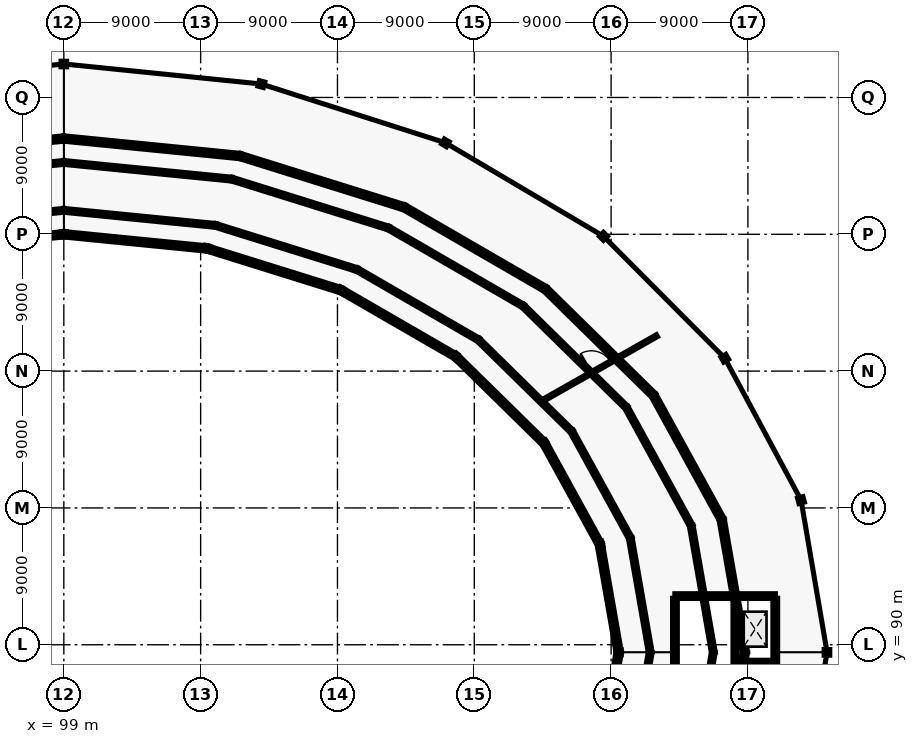
"""IFC4 building model, lengths in metres.
Left out: names, types, materials, properties, quantities, classifications, styles, units other than length and angle.
Written with IfcOpenShell. Run it as: python <this file> out.ifc"""

import sys

from ifc_helpers import new_model, si_unit, direction, frame, frame_2d, origin, origin_2d, place, context, subcontext, project, spatial, rectangle, hollow_circle, extrude, element, fill, save


model = new_model("IFC4")
c1 = context("Model", 3, precision=1e-05, world=origin(), true_north=direction((0.0, 1.0)))
c2 = subcontext(c1, "Body", "Model", "MODEL_VIEW")
j1 = project(units=[si_unit("LENGTHUNIT", "METRE"), si_unit("PLANEANGLEUNIT", "RADIAN")], contexts=[c1])
p1 = place(None, origin())
s1 = spatial("IfcSite", under=j1, at=p1, CompositionType="ELEMENT")
p2 = place(p1, origin())
s2 = spatial("IfcBuilding", under=s1, at=p2, CompositionType="ELEMENT")
p3 = place(p2, frame((0.0, 0.0, 9.6)))
s3 = spatial("IfcBuildingStorey", under=s2, at=p3, CompositionType="ELEMENT", Elevation=9.6)
p4 = place(p3, frame((135.5, 89.5, 0.0), z_axis=(0.0, 0.0, 1.0), x_axis=(1.0, 0.0, 0.0)))
e1 = element("IfcColumn", 1, at=p4, inside=s3, PredefinedType="COLUMN", context=c2, shape_type="SweptSolid", body=[
    extrude(hollow_circle(Radius=0.162, WallThickness=0.016, at=origin_2d()), origin(), (0.0, 0.0, 1.0), 4.38),
])
p5 = place(p3, frame((149.2, 89.5, 0.0), z_axis=(0.0, 0.0, 1.0), x_axis=(1.0, 0.0, 0.0)))
e2 = element("IfcColumn", 2, at=p5, inside=s3, PredefinedType="COLUMN", context=c2, shape_type="SweptSolid", body=[
    extrude(hollow_circle(Radius=0.178, WallThickness=0.016, at=origin_2d()), origin(), (0.0, 0.0, 1.0), 3.38),
])
p6 = place(p3, frame((134.256, 96.618, 0.0), z_axis=(0.0, 0.0, 1.0), x_axis=(0.965925826289, 0.258819045103, 0.0)))
e3 = element("IfcColumn", 3, at=p6, inside=s3, PredefinedType="COLUMN", context=c2, shape_type="SweptSolid", body=[
    extrude(hollow_circle(Radius=0.162, WallThickness=0.016, at=origin_2d()), origin(), (0.0, 0.0, 1.0), 4.38),
])
p7 = place(p3, frame((147.489, 99.516, 0.0), z_axis=(0.0, 0.0, 1.0), x_axis=(0.965925826289, 0.258819045103, 0.0)))
e4 = element("IfcColumn", 4, at=p7, inside=s3, PredefinedType="COLUMN", context=c2, shape_type="SweptSolid", body=[
    extrude(hollow_circle(Radius=0.178, WallThickness=0.016, at=origin_2d()), origin(), (0.0, 0.0, 1.0), 3.38),
])
p8 = place(p3, frame((130.61, 103.25, 0.0), z_axis=(0.0, 0.0, 1.0), x_axis=(0.866025403784, 0.5, 0.0)))
e5 = element("IfcColumn", 5, at=p8, inside=s3, PredefinedType="COLUMN", context=c2, shape_type="SweptSolid", body=[
    extrude(hollow_circle(Radius=0.162, WallThickness=0.016, at=origin_2d()), origin(), (0.0, 0.0, 1.0), 4.38),
])
p9 = place(p3, frame((142.474, 108.85, 0.0), z_axis=(0.0, 0.0, 1.0), x_axis=(0.866025403784, 0.5, 0.0)))
e6 = element("IfcColumn", 6, at=p9, inside=s3, PredefinedType="COLUMN", context=c2, shape_type="SweptSolid", body=[
    extrude(hollow_circle(Radius=0.178, WallThickness=0.016, at=origin_2d()), origin(), (0.0, 0.0, 1.0), 3.38),
])
p10 = place(p3, frame((124.809, 108.945, 0.0), z_axis=(0.0, 0.0, 1.0), x_axis=(0.707106781187, 0.707106781187, 0.0)))
e7 = element("IfcColumn", 7, at=p10, inside=s3, PredefinedType="COLUMN", context=c2, shape_type="SweptSolid", body=[
    extrude(hollow_circle(Radius=0.162, WallThickness=0.016, at=origin_2d()), origin(), (0.0, 0.0, 1.0), 4.38),
])
p11 = place(p3, frame((134.497, 116.865, 0.0), z_axis=(0.0, 0.0, 1.0), x_axis=(0.707106781187, 0.707106781187, 0.0)))
e8 = element("IfcColumn", 8, at=p11, inside=s3, PredefinedType="COLUMN", context=c2, shape_type="SweptSolid", body=[
    extrude(hollow_circle(Radius=0.178, WallThickness=0.016, at=origin_2d()), origin(), (0.0, 0.0, 1.0), 3.38),
])
p12 = place(p3, frame((117.25, 113.316, 0.0), z_axis=(0.0, 0.0, 1.0), x_axis=(0.5, 0.866025403784, 0.0)))
e9 = element("IfcColumn", 9, at=p12, inside=s3, PredefinedType="COLUMN", context=c2, shape_type="SweptSolid", body=[
    extrude(hollow_circle(Radius=0.162, WallThickness=0.016, at=origin_2d()), origin(), (0.0, 0.0, 1.0), 4.38),
])
p13 = place(p3, frame((124.1, 123.015, 0.0), z_axis=(0.0, 0.0, 1.0), x_axis=(0.5, 0.866025403784, 0.0)))
e10 = element("IfcColumn", 10, at=p13, inside=s3, PredefinedType="COLUMN", context=c2, shape_type="SweptSolid", body=[
    extrude(hollow_circle(Radius=0.178, WallThickness=0.016, at=origin_2d()), origin(), (0.0, 0.0, 1.0), 3.38),
])
p14 = place(p3, frame((108.447, 116.063, 0.0), z_axis=(0.0, 0.0, 1.0), x_axis=(0.258819045103, 0.965925826289, 0.0)))
e11 = element("IfcColumn", 11, at=p14, inside=s3, PredefinedType="COLUMN", context=c2, shape_type="SweptSolid", body=[
    extrude(hollow_circle(Radius=0.162, WallThickness=0.016, at=origin_2d()), origin(), (0.0, 0.0, 1.0), 4.38),
])
p15 = place(p3, frame((111.993, 126.881, 0.0), z_axis=(0.0, 0.0, 1.0), x_axis=(0.258819045103, 0.965925826289, 0.0)))
e12 = element("IfcColumn", 12, at=p15, inside=s3, PredefinedType="COLUMN", context=c2, shape_type="SweptSolid", body=[
    extrude(hollow_circle(Radius=0.178, WallThickness=0.016, at=origin_2d()), origin(), (0.0, 0.0, 1.0), 3.38),
])
p16 = place(p3, frame((99.0, 117.0, 0.0), z_axis=(0.0, 0.0, 1.0), x_axis=(0.0, 1.0, 0.0)))
e13 = element("IfcColumn", 13, at=p16, inside=s3, PredefinedType="COLUMN", context=c2, shape_type="SweptSolid", body=[
    extrude(hollow_circle(Radius=0.162, WallThickness=0.016, at=origin_2d()), origin(), (0.0, 0.0, 1.0), 4.38),
])
p17 = place(p3, frame((99.0, 128.2, 0.0), z_axis=(0.0, 0.0, 1.0), x_axis=(0.0, 1.0, 0.0)))
e14 = element("IfcColumn", 14, at=p17, inside=s3, PredefinedType="COLUMN", context=c2, shape_type="SweptSolid", body=[
    extrude(hollow_circle(Radius=0.178, WallThickness=0.016, at=origin_2d()), origin(), (0.0, 0.0, 1.0), 3.38),
])
p18 = place(p3, frame((143.8, 89.5, 4.53), z_axis=(0.0, 0.0, 1.0), x_axis=(-0.171964181022, 0.985103202941, 0.0)))
e15 = element("IfcWall", 15, at=p18, inside=s3, PredefinedType="SOLIDWALL", context=c2, shape_type="SweptSolid", body=[
    extrude(rectangle(XDim=8.88, YDim=0.34, at=frame_2d((4.44, 0.0))), origin(), (0.0, 0.0, 1.0), 3.02),
])
p19 = place(p3, frame((135.5, 89.5, 4.39), z_axis=(0.0, 0.0, 1.0), x_axis=(-0.172146745201, 0.985071316259, 0.0)))
e16 = element("IfcWall", 16, at=p19, inside=s3, PredefinedType="SOLIDWALL", context=c2, shape_type="SweptSolid", body=[
    extrude(rectangle(XDim=7.226, YDim=0.34, at=frame_2d((3.613, 0.0))), origin(), (0.0, 0.0, 1.0), 3.16),
])
p20 = place(p3, frame((141.725, 89.5, 7.58), z_axis=(0.0, 0.0, 1.0), x_axis=(-0.171983700119, 0.985099795398, 0.0)))
e17 = element("IfcWall", 17, at=p20, inside=s3, PredefinedType="SOLIDWALL", context=c2, shape_type="SweptSolid", body=[
    extrude(rectangle(XDim=8.466, YDim=0.24, at=frame_2d((4.233, 0.0))), origin(), (0.0, 0.0, 1.0), 2.37),
])
p21 = place(p3, frame((137.575, 89.5, 7.58), z_axis=(0.0, 0.0, 1.0), x_axis=(-0.172012838792, 0.985094707777, 0.0)))
e18 = element("IfcWall", 18, at=p21, inside=s3, PredefinedType="SOLIDWALL", context=c2, shape_type="SweptSolid", body=[
    extrude(rectangle(XDim=7.639, YDim=0.24, at=frame_2d((3.819, 0.0))), origin(), (0.0, 0.0, 1.0), 2.37),
])
p22 = place(p3, frame((142.273, 98.248, 4.53), z_axis=(0.0, 0.0, 1.0), x_axis=(-0.481203038707, 0.876609169208, 0.0)))
e19 = element("IfcWall", 19, at=p22, inside=s3, PredefinedType="SOLIDWALL", context=c2, shape_type="SweptSolid", body=[
    extrude(rectangle(XDim=9.299, YDim=0.34, at=frame_2d((4.65, 0.0))), origin(), (0.0, 0.0, 1.0), 3.02),
])
p23 = place(p3, frame((134.256, 96.618, 4.39), z_axis=(0.0, 0.0, 1.0), x_axis=(-0.481751565348, 0.876307839338, 0.0)))
e20 = element("IfcWall", 20, at=p23, inside=s3, PredefinedType="SOLIDWALL", context=c2, shape_type="SweptSolid", body=[
    extrude(rectangle(XDim=7.568, YDim=0.34, at=frame_2d((3.784, 0.0))), origin(), (0.0, 0.0, 1.0), 3.16),
])
p24 = place(p3, frame((140.269, 97.84, 7.58), z_axis=(0.0, 0.0, 1.0), x_axis=(-0.481354223541, 0.87652616132, 0.0)))
e21 = element("IfcWall", 21, at=p24, inside=s3, PredefinedType="SOLIDWALL", context=c2, shape_type="SweptSolid", body=[
    extrude(rectangle(XDim=8.867, YDim=0.24, at=frame_2d((4.433, 0.0))), origin(), (0.0, 0.0, 1.0), 2.37),
])
p25 = place(p3, frame((136.261, 97.025, 7.58), z_axis=(0.0, 0.0, 1.0), x_axis=(-0.481658705075, 0.876358883007, 0.0)))
e22 = element("IfcWall", 22, at=p25, inside=s3, PredefinedType="SOLIDWALL", context=c2, shape_type="SweptSolid", body=[
    extrude(rectangle(XDim=8.001, YDim=0.24, at=frame_2d((4.001, 0.0))), origin(), (0.0, 0.0, 1.0), 2.37),
])
p26 = place(p3, frame((137.798, 106.4, 4.53), z_axis=(0.0, 0.0, 1.0), x_axis=(-0.713096204455, 0.701066190307, 0.0)))
e23 = element("IfcWall", 23, at=p26, inside=s3, PredefinedType="SOLIDWALL", context=c2, shape_type="SweptSolid", body=[
    extrude(rectangle(XDim=9.985, YDim=0.34, at=frame_2d((4.992, 0.0))), origin(), (0.0, 0.0, 1.0), 3.02),
])
p27 = place(p3, frame((130.61, 103.25, 4.39), z_axis=(0.0, 0.0, 1.0), x_axis=(-0.713593723838, 0.700559774251, 0.0)))
e24 = element("IfcWall", 24, at=p27, inside=s3, PredefinedType="SOLIDWALL", context=c2, shape_type="SweptSolid", body=[
    extrude(rectangle(XDim=8.129, YDim=0.34, at=frame_2d((4.065, 0.0))), origin(), (0.0, 0.0, 1.0), 3.16),
])
p28 = place(p3, frame((136.001, 105.612, 7.58), z_axis=(0.0, 0.0, 1.0), x_axis=(-0.71311938496, 0.701042611254, 0.0)))
e25 = element("IfcWall", 25, at=p28, inside=s3, PredefinedType="SOLIDWALL", context=c2, shape_type="SweptSolid", body=[
    extrude(rectangle(XDim=9.521, YDim=0.24, at=frame_2d((4.761, 0.0))), origin(), (0.0, 0.0, 1.0), 2.37),
])
p29 = place(p3, frame((132.407, 104.037, 7.58), z_axis=(0.0, 0.0, 1.0), x_axis=(-0.713357861119, 0.700799944335, 0.0)))
e26 = element("IfcWall", 26, at=p29, inside=s3, PredefinedType="SOLIDWALL", context=c2, shape_type="SweptSolid", body=[
    extrude(rectangle(XDim=8.593, YDim=0.24, at=frame_2d((4.296, 0.0))), origin(), (0.0, 0.0, 1.0), 2.37),
])
p30 = place(p3, frame((130.678, 113.4, 4.53), z_axis=(0.0, 0.0, 1.0), x_axis=(-0.865403937833, 0.501074869039, 0.0)))
e27 = element("IfcWall", 27, at=p30, inside=s3, PredefinedType="SOLIDWALL", context=c2, shape_type="SweptSolid", body=[
    extrude(rectangle(XDim=10.721, YDim=0.34, at=frame_2d((5.361, 0.0))), origin(), (0.0, 0.0, 1.0), 3.02),
])
p31 = place(p3, frame((124.809, 108.945, 4.39), z_axis=(0.0, 0.0, 1.0), x_axis=(-0.865697347457, 0.500567780231, 0.0)))
e28 = element("IfcWall", 28, at=p31, inside=s3, PredefinedType="SOLIDWALL", context=c2, shape_type="SweptSolid", body=[
    extrude(rectangle(XDim=8.732, YDim=0.34, at=frame_2d((4.366, 0.0))), origin(), (0.0, 0.0, 1.0), 3.16),
])
p32 = place(p3, frame((129.211, 112.287, 7.58), z_axis=(0.0, 0.0, 1.0), x_axis=(-0.865494949489, 0.500917650328, 0.0)))
e29 = element("IfcWall", 29, at=p32, inside=s3, PredefinedType="SOLIDWALL", context=c2, shape_type="SweptSolid", body=[
    extrude(rectangle(XDim=10.223, YDim=0.24, at=frame_2d((5.111, 0.0))), origin(), (0.0, 0.0, 1.0), 2.37),
])
p33 = place(p3, frame((126.277, 110.059, 7.58), z_axis=(0.0, 0.0, 1.0), x_axis=(-0.865631472937, 0.500681688362, 0.0)))
e30 = element("IfcWall", 30, at=p33, inside=s3, PredefinedType="SOLIDWALL", context=c2, shape_type="SweptSolid", body=[
    extrude(rectangle(XDim=9.229, YDim=0.24, at=frame_2d((4.615, 0.0))), origin(), (0.0, 0.0, 1.0), 2.37),
])
p34 = place(p3, frame((121.4, 118.772, 4.53), z_axis=(0.0, 0.0, 1.0), x_axis=(-0.95449417592, 0.298229556107, 0.0)))
e31 = element("IfcWall", 31, at=p34, inside=s3, PredefinedType="SOLIDWALL", context=c2, shape_type="SweptSolid", body=[
    extrude(rectangle(XDim=11.32, YDim=0.34, at=frame_2d((5.66, 0.0))), origin(), (0.0, 0.0, 1.0), 3.02),
])
p35 = place(p3, frame((117.25, 113.316, 4.39), z_axis=(0.0, 0.0, 1.0), x_axis=(-0.9545990852, 0.297893582568, 0.0)))
e32 = element("IfcWall", 32, at=p35, inside=s3, PredefinedType="SOLIDWALL", context=c2, shape_type="SweptSolid", body=[
    extrude(rectangle(XDim=9.222, YDim=0.34, at=frame_2d((4.611, 0.0))), origin(), (0.0, 0.0, 1.0), 3.16),
])
p36 = place(p3, frame((120.363, 117.408, 7.58), z_axis=(0.0, 0.0, 1.0), x_axis=(-0.954514174424, 0.298165542651, 0.0)))
e33 = element("IfcWall", 33, at=p36, inside=s3, PredefinedType="SOLIDWALL", context=c2, shape_type="SweptSolid", body=[
    extrude(rectangle(XDim=10.796, YDim=0.24, at=frame_2d((5.398, 0.0))), origin(), (0.0, 0.0, 1.0), 2.37),
])
p37 = place(p3, frame((118.288, 114.68, 7.58), z_axis=(0.0, 0.0, 1.0), x_axis=(-0.954582431614, 0.29794694369, 0.0)))
e34 = element("IfcWall", 34, at=p37, inside=s3, PredefinedType="SOLIDWALL", context=c2, shape_type="SweptSolid", body=[
    extrude(rectangle(XDim=9.747, YDim=0.24, at=frame_2d((4.874, 0.0))), origin(), (0.0, 0.0, 1.0), 2.37),
])
p38 = place(p3, frame((110.595, 122.148, 4.53), z_axis=(0.0, 0.0, 1.0), x_axis=(-0.995099849345, 0.098875122419, 0.0)))
e35 = element("IfcWall", 35, at=p38, inside=s3, PredefinedType="SOLIDWALL", context=c2, shape_type="SweptSolid", body=[
    extrude(rectangle(XDim=11.652, YDim=0.34, at=frame_2d((5.826, 0.0))), origin(), (0.0, 0.0, 1.0), 3.02),
])
p39 = place(p3, frame((108.447, 116.063, 4.39), z_axis=(0.0, 0.0, 1.0), x_axis=(-0.995117073258, 0.098701623651, 0.0)))
e36 = element("IfcWall", 36, at=p39, inside=s3, PredefinedType="SOLIDWALL", context=c2, shape_type="SweptSolid", body=[
    extrude(rectangle(XDim=9.493, YDim=0.34, at=frame_2d((4.747, 0.0))), origin(), (0.0, 0.0, 1.0), 3.16),
])
p40 = place(p3, frame((110.058, 120.627, 7.58), z_axis=(0.0, 0.0, 1.0), x_axis=(-0.995105258288, 0.098820670548, 0.0)))
e37 = element("IfcWall", 37, at=p40, inside=s3, PredefinedType="SOLIDWALL", context=c2, shape_type="SweptSolid", body=[
    extrude(rectangle(XDim=11.113, YDim=0.24, at=frame_2d((5.556, 0.0))), origin(), (0.0, 0.0, 1.0), 2.37),
])
p41 = place(p3, frame((108.984, 117.584, 7.58), z_axis=(0.0, 0.0, 1.0), x_axis=(-0.995110163253, 0.098771266021, 0.0)))
e38 = element("IfcWall", 38, at=p41, inside=s3, PredefinedType="SOLIDWALL", context=c2, shape_type="SweptSolid", body=[
    extrude(rectangle(XDim=10.033, YDim=0.24, at=frame_2d((5.017, 0.0))), origin(), (0.0, 0.0, 1.0), 2.37),
])
p42 = place(p3, frame((99.0, 123.3, 4.53), z_axis=(0.0, 0.0, 1.0), x_axis=(-0.995099849345, -0.098875122419, 0.0)))
e39 = element("IfcWall", 39, at=p42, inside=s3, PredefinedType="SOLIDWALL", context=c2, shape_type="SweptSolid", body=[
    extrude(rectangle(XDim=11.652, YDim=0.34, at=frame_2d((5.826, 0.0))), origin(), (0.0, 0.0, 1.0), 3.02),
])
p43 = place(p3, frame((99.0, 117.0, 4.39), z_axis=(0.0, 0.0, 1.0), x_axis=(-0.995117073258, -0.098701623651, 0.0)))
e40 = element("IfcWall", 40, at=p43, inside=s3, PredefinedType="SOLIDWALL", context=c2, shape_type="SweptSolid", body=[
    extrude(rectangle(XDim=9.493, YDim=0.34, at=frame_2d((4.747, 0.0))), origin(), (0.0, 0.0, 1.0), 3.16),
])
p44 = place(p3, frame((99.0, 121.725, 7.58), z_axis=(0.0, 0.0, 1.0), x_axis=(-0.995105258288, -0.098820670548, 0.0)))
e41 = element("IfcWall", 41, at=p44, inside=s3, PredefinedType="SOLIDWALL", context=c2, shape_type="SweptSolid", body=[
    extrude(rectangle(XDim=11.113, YDim=0.24, at=frame_2d((5.556, 0.0))), origin(), (0.0, 0.0, 1.0), 2.37),
])
p45 = place(p3, frame((99.0, 118.575, 7.58), z_axis=(0.0, 0.0, 1.0), x_axis=(-0.995110163253, -0.098771266021, 0.0)))
e42 = element("IfcWall", 42, at=p45, inside=s3, PredefinedType="SOLIDWALL", context=c2, shape_type="SweptSolid", body=[
    extrude(rectangle(XDim=10.033, YDim=0.24, at=frame_2d((5.017, 0.0))), origin(), (0.0, 0.0, 1.0), 2.37),
])
p46 = place(p3, frame((142.273, 80.752, 4.53), z_axis=(0.0, 0.0, 1.0), x_axis=(0.171964181022, 0.985103202941, 0.0)))
e43 = element("IfcWall", 43, at=p46, inside=s3, PredefinedType="SOLIDWALL", context=c2, shape_type="SweptSolid", body=[
    extrude(rectangle(XDim=8.88, YDim=0.34, at=frame_2d((4.44, 0.0))), origin(), (0.0, 0.0, 1.0), 3.02),
])
p47 = place(p3, frame((134.256, 82.382, 4.39), z_axis=(0.0, 0.0, 1.0), x_axis=(0.172146745201, 0.985071316259, 0.0)))
e44 = element("IfcWall", 44, at=p47, inside=s3, PredefinedType="SOLIDWALL", context=c2, shape_type="SweptSolid", body=[
    extrude(rectangle(XDim=7.226, YDim=0.34, at=frame_2d((3.613, 0.0))), origin(), (0.0, 0.0, 1.0), 3.16),
])
p48 = place(p3, frame((140.269, 81.16, 7.58), z_axis=(0.0, 0.0, 1.0), x_axis=(0.171983700119, 0.985099795398, 0.0)))
e45 = element("IfcWall", 45, at=p48, inside=s3, PredefinedType="SOLIDWALL", context=c2, shape_type="SweptSolid", body=[
    extrude(rectangle(XDim=8.466, YDim=0.24, at=frame_2d((4.233, 0.0))), origin(), (0.0, 0.0, 1.0), 2.37),
])
p49 = place(p3, frame((136.261, 81.975, 7.58), z_axis=(0.0, 0.0, 1.0), x_axis=(0.172012838792, 0.985094707777, 0.0)))
e46 = element("IfcWall", 46, at=p49, inside=s3, PredefinedType="SOLIDWALL", context=c2, shape_type="SweptSolid", body=[
    extrude(rectangle(XDim=7.639, YDim=0.24, at=frame_2d((3.819, 0.0))), origin(), (0.0, 0.0, 1.0), 2.37),
])
p50 = place(p3, frame((139.2, 93.2, 0.0), z_axis=(0.0, 0.0, 1.0), x_axis=(1.0, 0.0, 0.0)))
e47 = element("IfcWall", 47, at=p50, inside=s3, PredefinedType="SHEAR", context=c2, shape_type="SweptSolid", body=[
    extrude(rectangle(XDim=6.6, YDim=0.3, at=frame_2d((3.3, 0.0))), origin(), (0.0, 0.0, 1.0), 3.4),
])
p51 = place(p3, frame((139.2, 85.95, 0.0), z_axis=(0.0, 0.0, 1.0), x_axis=(0.0, 1.0, 0.0)))
e48 = element("IfcWall", 48, at=p51, inside=s3, PredefinedType="SHEAR", context=c2, shape_type="SweptSolid", body=[
    extrude(rectangle(XDim=7.1, YDim=0.3, at=frame_2d((3.55, 0.0))), origin(), (0.0, 0.0, 1.0), 3.4),
])
p52 = place(p3, frame((145.8, 85.95, 0.0), z_axis=(0.0, 0.0, 1.0), x_axis=(0.0, 1.0, 0.0)))
e49 = element("IfcWall", 49, at=p52, inside=s3, PredefinedType="SHEAR", context=c2, shape_type="SweptSolid", body=[
    extrude(rectangle(XDim=7.1, YDim=0.3, at=frame_2d((3.55, 0.0))), origin(), (0.0, 0.0, 1.0), 3.4),
])
p53 = place(p52, frame((0.75, 0.0, 0.0)))
e50 = element("IfcOpeningElement", 50, at=p53, cuts=e49, PredefinedType="OPENING", context=c2, shape_type="SweptSolid", body=[
    extrude(rectangle(XDim=1.3, YDim=2.15, at=frame_2d((0.65, 1.075))), frame((0.0, 0.16, 0.0), z_axis=(0.0, -1.0, 0.0), x_axis=(1.0, 0.0, 0.0)), (0.0, 0.0, 1.0), 0.32),
])
p54 = place(p3, frame((143.15, 85.95, 0.0), z_axis=(0.0, 0.0, 1.0), x_axis=(0.0, 1.0, 0.0)))
e51 = element("IfcWall", 51, at=p54, inside=s3, PredefinedType="SHEAR", context=c2, shape_type="SweptSolid", body=[
    extrude(rectangle(XDim=7.1, YDim=0.25, at=frame_2d((3.55, 0.0))), origin(), (0.0, 0.0, 1.0), 3.4),
])
p55 = place(p54, frame((0.2, 0.0, 0.0)))
e52 = element("IfcOpeningElement", 52, at=p55, cuts=e51, PredefinedType="OPENING", context=c2, shape_type="SweptSolid", body=[
    extrude(rectangle(XDim=1.15, YDim=2.15, at=frame_2d((0.575, 1.075))), frame((0.0, 0.135, 0.0), z_axis=(0.0, -1.0, 0.0), x_axis=(1.0, 0.0, 0.0)), (0.0, 0.0, 1.0), 0.27),
])
p56 = place(p3, frame((143.27, 88.85, 0.0), z_axis=(0.0, 0.0, 1.0), x_axis=(1.0, 0.0, 0.0)))
e53 = element("IfcWall", 53, at=p56, inside=s3, PredefinedType="SHEAR", context=c2, shape_type="SweptSolid", body=[
    extrude(rectangle(XDim=2.38, YDim=0.25, at=frame_2d((1.19, 0.0))), origin(), (0.0, 0.0, 1.0), 3.4),
])
p57 = place(p56, frame((0.64, 0.0, 0.0)))
e54 = element("IfcOpeningElement", 54, at=p57, cuts=e53, PredefinedType="OPENING", context=c2, shape_type="SweptSolid", body=[
    extrude(rectangle(XDim=1.1, YDim=2.15, at=frame_2d((0.55, 1.075))), frame((0.0, 0.135, 0.0), z_axis=(0.0, -1.0, 0.0), x_axis=(1.0, 0.0, 0.0)), (0.0, 0.0, 1.0), 0.27),
])
p58 = place(p3, frame((130.667, 106.159, 0.0), z_axis=(0.0, 0.0, 1.0), x_axis=(0.869564093622, 0.493820095869, 0.0)))
e55 = element("IfcWall", 55, at=p58, inside=s3, PredefinedType="PARTITIONING", context=c2, shape_type="SweptSolid", body=[
    extrude(rectangle(XDim=8.442, YDim=0.13, at=frame_2d((4.221, 0.0))), origin(), (0.0, 0.0, 1.0), 2.9),
])
p59 = place(p58, frame((3.496, 0.0, 0.0)))
e56 = element("IfcOpeningElement", 56, at=p59, cuts=e55, PredefinedType="OPENING", context=c2, shape_type="SweptSolid", body=[
    extrude(rectangle(XDim=1.45, YDim=2.15, at=frame_2d((0.725, 1.075))), frame((0.0, 0.075, 0.0), z_axis=(0.0, -1.0, 0.0), x_axis=(1.0, 0.0, 0.0)), (0.0, 0.0, 1.0), 0.15),
])
p60 = place(p57, origin())
e57 = element("IfcDoor", 57, at=p60, inside=s3, OperationType="SLIDING_TO_LEFT", PredefinedType="DOOR", context=c2, shape_type="SweptSolid", body=[
    extrude(rectangle(XDim=1.1, YDim=2.15, at=frame_2d((0.55, 1.075))), frame((0.0, 0.025, 0.0), z_axis=(0.0, -1.0, 0.0), x_axis=(1.0, 0.0, 0.0)), (0.0, 0.0, 1.0), 0.05),
])
fill(e54, e57)
p61 = place(p59, origin())
e58 = element("IfcDoor", 58, at=p61, inside=s3, OperationType="SINGLE_SWING_LEFT", PredefinedType="DOOR", context=c2, shape_type="SweptSolid", body=[
    extrude(rectangle(XDim=1.45, YDim=2.15, at=frame_2d((0.725, 1.075))), frame((0.0, 0.025, 0.0), z_axis=(0.0, -1.0, 0.0), x_axis=(1.0, 0.0, 0.0)), (0.0, 0.0, 1.0), 0.05),
])
fill(e56, e58)
save(model, sys.argv[1])
